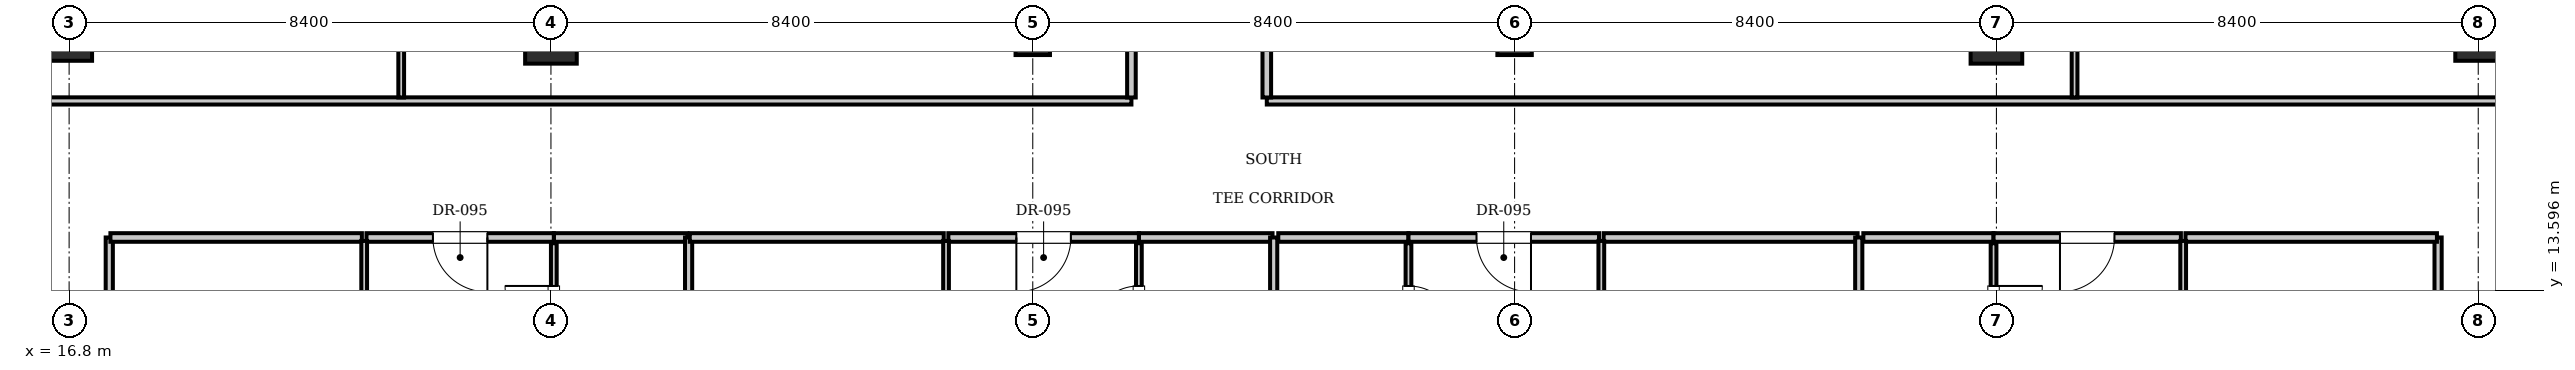
"""IFC4 building model, lengths in metres.
Left out: names, types, materials, properties, quantities, classifications, styles, units other than length and angle.
Written with IfcOpenShell. Run it as: python <this file> out.ifc"""

import sys

from ifc_helpers import new_model, si_unit, direction, frame, frame_2d, origin, origin_2d, place, context, subcontext, project, spatial, rectangle, i_section, extrude, element, fill, save


model = new_model("IFC4")
c1 = context("Model", 3, precision=1e-05, world=origin(), true_north=direction((0.0, 1.0)))
c2 = subcontext(c1, "Body", "Model", "MODEL_VIEW")
j1 = project(units=[si_unit("LENGTHUNIT", "METRE"), si_unit("PLANEANGLEUNIT", "RADIAN")], contexts=[c1])
p1 = place(None, origin())
s1 = spatial("IfcSite", under=j1, at=p1, CompositionType="ELEMENT")
p2 = place(p1, origin())
s2 = spatial("IfcBuilding", under=s1, at=p2, CompositionType="ELEMENT")
p3 = place(p2, frame((0.0, 0.0, 138.95)))
s3 = spatial("IfcBuildingStorey", under=s2, at=p3, CompositionType="ELEMENT", Elevation=138.95)
for number, where, z_axis, x_axis in (
    (1, (25.2, 18.0, 0.0), (0.0, 0.0, 1.0), (1.0, 0.0, 0.0)),
    (2, (50.4, 18.0, 0.0), (0.0, 0.0, 1.0), (1.0, 0.0, 0.0)),
):
    element("IfcColumn", number, at=place(p3, frame(where, z_axis=z_axis, x_axis=x_axis)), inside=s3, PredefinedType="COLUMN", context=c2, shape_type="SweptSolid", body=[
        extrude(rectangle(XDim=0.9, YDim=0.9, at=origin_2d()), origin(), (0.0, 0.0, 1.0), 3.85),
    ])
for number, where, z_axis, x_axis in (
    (3, (33.6, 18.0, 0.0), (0.0, 0.0, 1.0), (1.0, 0.0, 0.0)),
    (4, (42.0, 18.0, 0.0), (0.0, 0.0, 1.0), (1.0, 0.0, 0.0)),
):
    element("IfcColumn", number, at=place(p3, frame(where, z_axis=z_axis, x_axis=x_axis)), inside=s3, PredefinedType="COLUMN", context=c2, shape_type="SweptSolid", body=[
        extrude(i_section(OverallWidth=0.6, OverallDepth=0.6, WebThickness=0.025, FlangeThickness=0.038, at=origin_2d()), origin(), (0.0, 0.0, 1.0), 3.85),
    ])
for number, where, z_axis, x_axis in (
    (5, (16.8, 18.0, 0.0), (0.0, 0.0, 1.0), (1.0, 0.0, 0.0)),
    (6, (58.8, 18.0, 0.0), (0.0, 0.0, 1.0), (1.0, 0.0, 0.0)),
):
    element("IfcColumn", number, at=place(p3, frame(where, z_axis=z_axis, x_axis=x_axis)), inside=s3, PredefinedType="COLUMN", context=c2, shape_type="SweptSolid", body=[
        extrude(rectangle(XDim=0.8, YDim=0.8, at=origin_2d()), origin(), (0.0, 0.0, 1.0), 3.85),
    ])
for number, where, z_axis, x_axis in (
    (7, (17.5, 9.0, 0.0), (0.0, 0.0, 1.0), (0.0, 1.0, 0.0)),
    (8, (58.1, 9.0, 0.0), (0.0, 0.0, 1.0), (0.0, 1.0, 0.0)),
):
    element("IfcWall", number, at=place(p3, frame(where, z_axis=z_axis, x_axis=x_axis)), inside=s3, PredefinedType="PARTITIONING", context=c2, shape_type="SweptSolid", body=[
        extrude(rectangle(XDim=5.52, YDim=0.125, at=frame_2d((2.76, 0.0))), origin(), (0.0, 0.0, 1.0), 3.61),
    ])
p4 = place(p3, frame((25.25, 14.52, 0.0), z_axis=(0.0, 0.0, 1.0), x_axis=(1.0, 0.0, 0.0)))
e9 = element("IfcWall", 9, at=p4, inside=s3, PredefinedType="PARTITIONING", context=c2, shape_type="SweptSolid", body=[
    extrude(rectangle(XDim=2.33, YDim=0.15, at=frame_2d((1.165, 0.0))), origin(), (0.0, 0.0, 1.0), 3.61),
])
p5 = place(p3, frame((25.25, 12.08, 0.0), z_axis=(0.0, 0.0, 1.0), x_axis=(0.0, 1.0, 0.0)))
e10 = element("IfcWall", 10, at=p5, inside=s3, PredefinedType="PARTITIONING", context=c2, shape_type="SweptSolid", body=[
    extrude(rectangle(XDim=2.34, YDim=0.1, at=frame_2d((1.17, 0.0))), origin(), (0.0, 0.0, 1.0), 2.998),
])
p6 = place(p5, frame((0.745, 0.0, 0.0)))
e11 = element("IfcOpeningElement", 11, at=p6, cuts=e10, PredefinedType="OPENING", context=c2, shape_type="SweptSolid", body=[
    extrude(rectangle(XDim=0.85, YDim=2.1, at=frame_2d((0.425, 1.05))), frame((0.0, 0.06, 0.0), z_axis=(0.0, -1.0, 0.0), x_axis=(1.0, 0.0, 0.0)), (0.0, 0.0, 1.0), 0.12),
])
p7 = place(p3, frame((17.52, 14.52, 0.0), z_axis=(0.0, 0.0, 1.0), x_axis=(1.0, 0.0, 0.0)))
e12 = element("IfcWall", 12, at=p7, inside=s3, PredefinedType="PARTITIONING", context=c2, shape_type="SweptSolid", body=[
    extrude(rectangle(XDim=4.384, YDim=0.15, at=frame_2d((2.192, 0.0))), origin(), (0.0, 0.0, 1.0), 3.61),
])
p8 = place(p3, frame((21.984, 14.52, 0.0), z_axis=(0.0, 0.0, 1.0), x_axis=(1.0, 0.0, 0.0)))
e13 = element("IfcWall", 13, at=p8, inside=s3, PredefinedType="PARTITIONING", context=c2, shape_type="SweptSolid", body=[
    extrude(rectangle(XDim=3.266, YDim=0.15, at=frame_2d((1.633, 0.0))), origin(), (0.0, 0.0, 1.0), 3.61),
])
p9 = place(p8, frame((1.158, 0.0, 0.0)))
e14 = element("IfcOpeningElement", 14, at=p9, cuts=e13, PredefinedType="OPENING", context=c2, shape_type="SweptSolid", body=[
    extrude(rectangle(XDim=0.95, YDim=2.15, at=frame_2d((0.475, 1.075))), frame((0.0, 0.085, 0.0), z_axis=(0.0, -1.0, 0.0), x_axis=(1.0, 0.0, 0.0)), (0.0, 0.0, 1.0), 0.17),
])
p10 = place(p3, frame((21.944, 4.63, 0.0), z_axis=(0.0, 0.0, 1.0), x_axis=(0.0, 1.0, 0.0)))
e15 = element("IfcWall", 15, at=p10, inside=s3, PredefinedType="PARTITIONING", context=c2, shape_type="SweptSolid", body=[
    extrude(rectangle(XDim=9.83, YDim=0.1, at=frame_2d((4.915, 0.0))), origin(), (0.0, 0.0, 1.0), 3.61),
])
p11 = place(p10, frame((1.6, 0.0, 0.0)))
e16 = element("IfcOpeningElement", 16, at=p11, cuts=e15, PredefinedType="OPENING", context=c2, shape_type="SweptSolid", body=[
    extrude(rectangle(XDim=0.9, YDim=2.1, at=frame_2d((0.45, 1.05))), frame((0.0, 0.06, 0.0), z_axis=(0.0, -1.0, 0.0), x_axis=(1.0, 0.0, 0.0)), (0.0, 0.0, 1.0), 0.12),
])
p12 = place(p3, frame((27.6, 4.7, 0.0), z_axis=(0.0, 0.0, 1.0), x_axis=(0.0, 1.0, 0.0)))
e17 = element("IfcWall", 17, at=p12, inside=s3, PredefinedType="PARTITIONING", context=c2, shape_type="SweptSolid", body=[
    extrude(rectangle(XDim=9.82, YDim=0.125, at=frame_2d((4.91, 0.0))), origin(), (0.0, 0.0, 1.0), 3.61),
])
p13 = place(p3, frame((35.45, 14.52, 0.0), z_axis=(0.0, 0.0, 1.0), x_axis=(1.0, 0.0, 0.0)))
e18 = element("IfcWall", 18, at=p13, inside=s3, PredefinedType="PARTITIONING", context=c2, shape_type="SweptSolid", body=[
    extrude(rectangle(XDim=2.33, YDim=0.15, at=frame_2d((1.165, 0.0))), origin(), (0.0, 0.0, 1.0), 3.61),
])
p14 = place(p3, frame((35.45, 12.08, 0.0), z_axis=(0.0, 0.0, 1.0), x_axis=(0.0, 1.0, 0.0)))
e19 = element("IfcWall", 19, at=p14, inside=s3, PredefinedType="PARTITIONING", context=c2, shape_type="SweptSolid", body=[
    extrude(rectangle(XDim=2.34, YDim=0.1, at=frame_2d((1.17, 0.0))), origin(), (0.0, 0.0, 1.0), 3.61),
])
p15 = place(p14, frame((0.745, 0.0, 0.0)))
e20 = element("IfcOpeningElement", 20, at=p15, cuts=e19, PredefinedType="OPENING", context=c2, shape_type="SweptSolid", body=[
    extrude(rectangle(XDim=0.85, YDim=2.1, at=frame_2d((0.425, 1.05))), frame((0.0, 0.06, 0.0), z_axis=(0.0, -1.0, 0.0), x_axis=(1.0, 0.0, 0.0)), (0.0, 0.0, 1.0), 0.12),
])
p16 = place(p3, frame((27.62, 14.52, 0.0), z_axis=(0.0, 0.0, 1.0), x_axis=(1.0, 0.0, 0.0)))
e21 = element("IfcWall", 21, at=p16, inside=s3, PredefinedType="PARTITIONING", context=c2, shape_type="SweptSolid", body=[
    extrude(rectangle(XDim=4.428, YDim=0.15, at=frame_2d((2.214, 0.0))), origin(), (0.0, 0.0, 1.0), 3.61),
])
p17 = place(p3, frame((32.128, 14.52, 0.0), z_axis=(0.0, 0.0, 1.0), x_axis=(1.0, 0.0, 0.0)))
e22 = element("IfcWall", 22, at=p17, inside=s3, PredefinedType="PARTITIONING", context=c2, shape_type="SweptSolid", body=[
    extrude(rectangle(XDim=3.322, YDim=0.15, at=frame_2d((1.661, 0.0))), origin(), (0.0, 0.0, 1.0), 3.61),
])
p18 = place(p17, frame((1.186, 0.0, 0.0)))
e23 = element("IfcOpeningElement", 23, at=p18, cuts=e22, PredefinedType="OPENING", context=c2, shape_type="SweptSolid", body=[
    extrude(rectangle(XDim=0.95, YDim=2.15, at=frame_2d((0.475, 1.075))), frame((0.0, 0.085, 0.0), z_axis=(0.0, -1.0, 0.0), x_axis=(1.0, 0.0, 0.0)), (0.0, 0.0, 1.0), 0.17),
])
p19 = place(p3, frame((32.088, 4.63, 0.0), z_axis=(0.0, 0.0, 1.0), x_axis=(0.0, 1.0, 0.0)))
e24 = element("IfcWall", 24, at=p19, inside=s3, PredefinedType="PARTITIONING", context=c2, shape_type="SweptSolid", body=[
    extrude(rectangle(XDim=9.83, YDim=0.1, at=frame_2d((4.915, 0.0))), origin(), (0.0, 0.0, 1.0), 3.61),
])
p20 = place(p19, frame((1.6, 0.0, 0.0)))
e25 = element("IfcOpeningElement", 25, at=p20, cuts=e24, PredefinedType="OPENING", context=c2, shape_type="SweptSolid", body=[
    extrude(rectangle(XDim=0.9, YDim=2.1, at=frame_2d((0.45, 1.05))), frame((0.0, 0.06, 0.0), z_axis=(0.0, -1.0, 0.0), x_axis=(1.0, 0.0, 0.0)), (0.0, 0.0, 1.0), 0.12),
])
p21 = place(p3, frame((37.8, 4.7, 0.0), z_axis=(0.0, 0.0, 1.0), x_axis=(0.0, 1.0, 0.0)))
e26 = element("IfcWall", 26, at=p21, inside=s3, PredefinedType="PARTITIONING", context=c2, shape_type="SweptSolid", body=[
    extrude(rectangle(XDim=9.82, YDim=0.125, at=frame_2d((4.91, 0.0))), origin(), (0.0, 0.0, 1.0), 3.255),
])
p22 = place(p3, frame((37.88, 14.52, 0.0), z_axis=(0.0, 0.0, 1.0), x_axis=(1.0, 0.0, 0.0)))
e27 = element("IfcWall", 27, at=p22, inside=s3, PredefinedType="PARTITIONING", context=c2, shape_type="SweptSolid", body=[
    extrude(rectangle(XDim=2.27, YDim=0.15, at=frame_2d((1.135, 0.0))), origin(), (0.0, 0.0, 1.0), 3.61),
])
p23 = place(p3, frame((40.15, 12.08, 0.0), z_axis=(0.0, 0.0, 1.0), x_axis=(0.0, 1.0, 0.0)))
e28 = element("IfcWall", 28, at=p23, inside=s3, PredefinedType="PARTITIONING", context=c2, shape_type="SweptSolid", body=[
    extrude(rectangle(XDim=2.34, YDim=0.1, at=frame_2d((1.17, 0.0))), origin(), (0.0, 0.0, 1.0), 3.61),
])
p24 = place(p23, frame((0.745, 0.0, 0.0)))
e29 = element("IfcOpeningElement", 29, at=p24, cuts=e28, PredefinedType="OPENING", context=c2, shape_type="SweptSolid", body=[
    extrude(rectangle(XDim=0.85, YDim=2.1, at=frame_2d((0.425, 1.05))), frame((0.0, 0.06, 0.0), z_axis=(0.0, -1.0, 0.0), x_axis=(1.0, 0.0, 0.0)), (0.0, 0.0, 1.0), 0.12),
])
p25 = place(p3, frame((40.15, 14.52, 0.0), z_axis=(0.0, 0.0, 1.0), x_axis=(1.0, 0.0, 0.0)))
e30 = element("IfcWall", 30, at=p25, inside=s3, PredefinedType="PARTITIONING", context=c2, shape_type="SweptSolid", body=[
    extrude(rectangle(XDim=3.322, YDim=0.15, at=frame_2d((1.661, 0.0))), origin(), (0.0, 0.0, 1.0), 3.61),
])
p26 = place(p25, frame((1.186, 0.0, 0.0)))
e31 = element("IfcOpeningElement", 31, at=p26, cuts=e30, PredefinedType="OPENING", context=c2, shape_type="SweptSolid", body=[
    extrude(rectangle(XDim=0.95, YDim=2.15, at=frame_2d((0.475, 1.075))), frame((0.0, 0.085, 0.0), z_axis=(0.0, -1.0, 0.0), x_axis=(1.0, 0.0, 0.0)), (0.0, 0.0, 1.0), 0.17),
])
p27 = place(p3, frame((43.552, 14.52, 0.0), z_axis=(0.0, 0.0, 1.0), x_axis=(1.0, 0.0, 0.0)))
e32 = element("IfcWall", 32, at=p27, inside=s3, PredefinedType="PARTITIONING", context=c2, shape_type="SweptSolid", body=[
    extrude(rectangle(XDim=4.428, YDim=0.15, at=frame_2d((2.214, 0.0))), origin(), (0.0, 0.0, 1.0), 3.61),
])
p28 = place(p3, frame((43.512, 4.63, 0.0), z_axis=(0.0, 0.0, 1.0), x_axis=(0.0, 1.0, 0.0)))
e33 = element("IfcWall", 33, at=p28, inside=s3, PredefinedType="PARTITIONING", context=c2, shape_type="SweptSolid", body=[
    extrude(rectangle(XDim=9.83, YDim=0.1, at=frame_2d((4.915, 0.0))), origin(), (0.0, 0.0, 1.0), 3.61),
])
p29 = place(p28, frame((1.6, 0.0, 0.0)))
e34 = element("IfcOpeningElement", 34, at=p29, cuts=e33, PredefinedType="OPENING", context=c2, shape_type="SweptSolid", body=[
    extrude(rectangle(XDim=0.9, YDim=2.1, at=frame_2d((0.45, 1.05))), frame((0.0, 0.06, 0.0), z_axis=(0.0, -1.0, 0.0), x_axis=(1.0, 0.0, 0.0)), (0.0, 0.0, 1.0), 0.12),
])
p30 = place(p3, frame((48.0, 4.7, 0.0), z_axis=(0.0, 0.0, 1.0), x_axis=(0.0, 1.0, 0.0)))
e35 = element("IfcWall", 35, at=p30, inside=s3, PredefinedType="PARTITIONING", context=c2, shape_type="SweptSolid", body=[
    extrude(rectangle(XDim=9.82, YDim=0.125, at=frame_2d((4.91, 0.0))), origin(), (0.0, 0.0, 1.0), 3.61),
])
p31 = place(p3, frame((48.08, 14.52, 0.0), z_axis=(0.0, 0.0, 1.0), x_axis=(1.0, 0.0, 0.0)))
e36 = element("IfcWall", 36, at=p31, inside=s3, PredefinedType="PARTITIONING", context=c2, shape_type="SweptSolid", body=[
    extrude(rectangle(XDim=2.27, YDim=0.15, at=frame_2d((1.135, 0.0))), origin(), (0.0, 0.0, 1.0), 3.61),
])
p32 = place(p3, frame((50.35, 12.08, 0.0), z_axis=(0.0, 0.0, 1.0), x_axis=(0.0, 1.0, 0.0)))
e37 = element("IfcWall", 37, at=p32, inside=s3, PredefinedType="PARTITIONING", context=c2, shape_type="SweptSolid", body=[
    extrude(rectangle(XDim=2.34, YDim=0.1, at=frame_2d((1.17, 0.0))), origin(), (0.0, 0.0, 1.0), 2.998),
])
p33 = place(p32, frame((0.745, 0.0, 0.0)))
e38 = element("IfcOpeningElement", 38, at=p33, cuts=e37, PredefinedType="OPENING", context=c2, shape_type="SweptSolid", body=[
    extrude(rectangle(XDim=0.85, YDim=2.1, at=frame_2d((0.425, 1.05))), frame((0.0, 0.06, 0.0), z_axis=(0.0, -1.0, 0.0), x_axis=(1.0, 0.0, 0.0)), (0.0, 0.0, 1.0), 0.12),
])
p34 = place(p3, frame((50.35, 14.52, 0.0), z_axis=(0.0, 0.0, 1.0), x_axis=(1.0, 0.0, 0.0)))
e39 = element("IfcWall", 39, at=p34, inside=s3, PredefinedType="PARTITIONING", context=c2, shape_type="SweptSolid", body=[
    extrude(rectangle(XDim=3.266, YDim=0.15, at=frame_2d((1.633, 0.0))), origin(), (0.0, 0.0, 1.0), 3.61),
])
p35 = place(p34, frame((1.158, 0.0, 0.0)))
e40 = element("IfcOpeningElement", 40, at=p35, cuts=e39, PredefinedType="OPENING", context=c2, shape_type="SweptSolid", body=[
    extrude(rectangle(XDim=0.95, YDim=2.15, at=frame_2d((0.475, 1.075))), frame((0.0, 0.085, 0.0), z_axis=(0.0, -1.0, 0.0), x_axis=(1.0, 0.0, 0.0)), (0.0, 0.0, 1.0), 0.17),
])
p36 = place(p3, frame((53.696, 14.52, 0.0), z_axis=(0.0, 0.0, 1.0), x_axis=(1.0, 0.0, 0.0)))
e41 = element("IfcWall", 41, at=p36, inside=s3, PredefinedType="PARTITIONING", context=c2, shape_type="SweptSolid", body=[
    extrude(rectangle(XDim=4.384, YDim=0.15, at=frame_2d((2.192, 0.0))), origin(), (0.0, 0.0, 1.0), 3.61),
])
p37 = place(p3, frame((53.656, 4.63, 0.0), z_axis=(0.0, 0.0, 1.0), x_axis=(0.0, 1.0, 0.0)))
e42 = element("IfcWall", 42, at=p37, inside=s3, PredefinedType="PARTITIONING", context=c2, shape_type="SweptSolid", body=[
    extrude(rectangle(XDim=9.83, YDim=0.1, at=frame_2d((4.915, 0.0))), origin(), (0.0, 0.0, 1.0), 3.61),
])
p38 = place(p37, frame((1.6, 0.0, 0.0)))
e43 = element("IfcOpeningElement", 43, at=p38, cuts=e42, PredefinedType="OPENING", context=c2, shape_type="SweptSolid", body=[
    extrude(rectangle(XDim=0.9, YDim=2.1, at=frame_2d((0.45, 1.05))), frame((0.0, 0.06, 0.0), z_axis=(0.0, -1.0, 0.0), x_axis=(1.0, 0.0, 0.0)), (0.0, 0.0, 1.0), 0.12),
])
p39 = place(p3, frame((13.2, 16.9, 0.0), z_axis=(0.0, 0.0, 1.0), x_axis=(1.0, 0.0, 0.0)))
e44 = element("IfcWall", 44, at=p39, inside=s3, PredefinedType="PARTITIONING", context=c2, shape_type="SweptSolid", body=[
    extrude(rectangle(XDim=22.12, YDim=0.125, at=frame_2d((11.06, 0.0))), origin(), (0.0, 0.0, 1.0), 3.61),
])
p40 = place(p3, frame((37.68, 16.9, 0.0), z_axis=(0.0, 0.0, 1.0), x_axis=(1.0, 0.0, 0.0)))
e45 = element("IfcWall", 45, at=p40, inside=s3, PredefinedType="PARTITIONING", context=c2, shape_type="SweptSolid", body=[
    extrude(rectangle(XDim=24.72, YDim=0.125, at=frame_2d((12.36, 0.0))), origin(), (0.0, 0.0, 1.0), 3.61),
])
p41 = place(p3, frame((35.32, 16.96, 0.0), z_axis=(0.0, 0.0, 1.0), x_axis=(0.0, 1.0, 0.0)))
e46 = element("IfcWall", 46, at=p41, inside=s3, PredefinedType="PARTITIONING", context=c2, shape_type="SweptSolid", body=[
    extrude(rectangle(XDim=2.72, YDim=0.15, at=frame_2d((1.36, 0.0))), origin(), (0.0, 0.0, 1.0), 3.61),
])
p42 = place(p41, frame((0.885, 0.0, 0.0)))
e47 = element("IfcOpeningElement", 47, at=p42, cuts=e46, PredefinedType="OPENING", context=c2, shape_type="SweptSolid", body=[
    extrude(rectangle(XDim=0.95, YDim=2.15, at=frame_2d((0.475, 1.075))), frame((0.0, 0.085, 0.0), z_axis=(0.0, -1.0, 0.0), x_axis=(1.0, 0.0, 0.0)), (0.0, 0.0, 1.0), 0.17),
])
p43 = place(p3, frame((22.59, 16.96, 0.0), z_axis=(0.0, 0.0, 1.0), x_axis=(0.0, 1.0, 0.0)))
e48 = element("IfcWall", 48, at=p43, inside=s3, PredefinedType="PARTITIONING", context=c2, shape_type="SweptSolid", body=[
    extrude(rectangle(XDim=4.61, YDim=0.1, at=frame_2d((2.305, 0.0))), origin(), (0.0, 0.0, 1.0), 3.61),
])
p44 = place(p43, frame((1.855, 0.0, 0.0)))
e49 = element("IfcOpeningElement", 49, at=p44, cuts=e48, PredefinedType="OPENING", context=c2, shape_type="SweptSolid", body=[
    extrude(rectangle(XDim=0.9, YDim=2.1, at=frame_2d((0.45, 1.05))), frame((0.0, 0.06, 0.0), z_axis=(0.0, -1.0, 0.0), x_axis=(1.0, 0.0, 0.0)), (0.0, 0.0, 1.0), 0.12),
])
p45 = place(p3, frame((37.68, 16.96, 0.0), z_axis=(0.0, 0.0, 1.0), x_axis=(0.0, 1.0, 0.0)))
e50 = element("IfcWall", 50, at=p45, inside=s3, PredefinedType="PARTITIONING", context=c2, shape_type="SweptSolid", body=[
    extrude(rectangle(XDim=2.72, YDim=0.15, at=frame_2d((1.36, 0.0))), origin(), (0.0, 0.0, 1.0), 3.255),
])
p46 = place(p45, frame((0.885, 0.0, 0.0)))
e51 = element("IfcOpeningElement", 51, at=p46, cuts=e50, PredefinedType="OPENING", context=c2, shape_type="SweptSolid", body=[
    extrude(rectangle(XDim=0.95, YDim=2.15, at=frame_2d((0.475, 1.075))), frame((0.0, 0.085, 0.0), z_axis=(0.0, -1.0, 0.0), x_axis=(1.0, 0.0, 0.0)), (0.0, 0.0, 1.0), 0.17),
])
p47 = place(p3, frame((51.762, 16.96, 0.0), z_axis=(0.0, 0.0, 1.0), x_axis=(0.0, 1.0, 0.0)))
e52 = element("IfcWall", 52, at=p47, inside=s3, PredefinedType="PARTITIONING", context=c2, shape_type="SweptSolid", body=[
    extrude(rectangle(XDim=4.61, YDim=0.1, at=frame_2d((2.305, 0.0))), origin(), (0.0, 0.0, 1.0), 3.61),
])
p48 = place(p47, frame((1.855, 0.0, 0.0)))
e53 = element("IfcOpeningElement", 53, at=p48, cuts=e52, PredefinedType="OPENING", context=c2, shape_type="SweptSolid", body=[
    extrude(rectangle(XDim=0.9, YDim=2.1, at=frame_2d((0.45, 1.05))), frame((0.0, 0.06, 0.0), z_axis=(0.0, -1.0, 0.0), x_axis=(1.0, 0.0, 0.0)), (0.0, 0.0, 1.0), 0.12),
])
p49 = place(p6, origin())
e54 = element("IfcDoor", 54, at=p49, inside=s3, OperationType="SINGLE_SWING_RIGHT", PredefinedType="DOOR", context=c2, shape_type="SweptSolid", body=[
    extrude(rectangle(XDim=0.85, YDim=2.1, at=frame_2d((0.425, 1.05))), frame((0.0, 0.025, 0.0), z_axis=(0.0, -1.0, 0.0), x_axis=(1.0, 0.0, 0.0)), (0.0, 0.0, 1.0), 0.05),
])
fill(e11, e54)
p50 = place(p9, frame((0.95, 0.0, 0.0), z_axis=(0.0, 0.0, 1.0), x_axis=(-1.0, 0.0, 0.0)))
e55 = element("IfcDoor", 55, at=p50, inside=s3, OperationType="SINGLE_SWING_LEFT", PredefinedType="DOOR", context=c2, shape_type="SweptSolid", body=[
    extrude(rectangle(XDim=0.95, YDim=2.15, at=frame_2d((0.475, 1.075))), frame((0.0, 0.025, 0.0), z_axis=(0.0, -1.0, 0.0), x_axis=(1.0, 0.0, 0.0)), (0.0, 0.0, 1.0), 0.05),
])
fill(e14, e55)
p51 = place(p15, origin())
e56 = element("IfcDoor", 56, at=p51, inside=s3, OperationType="SINGLE_SWING_LEFT", PredefinedType="DOOR", context=c2, shape_type="SweptSolid", body=[
    extrude(rectangle(XDim=0.85, YDim=2.1, at=frame_2d((0.425, 1.05))), frame((0.0, 0.025, 0.0), z_axis=(0.0, -1.0, 0.0), x_axis=(1.0, 0.0, 0.0)), (0.0, 0.0, 1.0), 0.05),
])
fill(e20, e56)
p52 = place(p18, frame((0.95, 0.0, 0.0), z_axis=(0.0, 0.0, 1.0), x_axis=(-1.0, 0.0, 0.0)))
e57 = element("IfcDoor", 57, at=p52, inside=s3, OperationType="SINGLE_SWING_RIGHT", PredefinedType="DOOR", context=c2, shape_type="SweptSolid", body=[
    extrude(rectangle(XDim=0.95, YDim=2.15, at=frame_2d((0.475, 1.075))), frame((0.0, 0.025, 0.0), z_axis=(0.0, -1.0, 0.0), x_axis=(1.0, 0.0, 0.0)), (0.0, 0.0, 1.0), 0.05),
])
fill(e23, e57)
p53 = place(p24, frame((0.85, 0.0, 0.0), z_axis=(0.0, 0.0, 1.0), x_axis=(-1.0, 0.0, 0.0)))
e58 = element("IfcDoor", 58, at=p53, inside=s3, OperationType="SINGLE_SWING_RIGHT", PredefinedType="DOOR", context=c2, shape_type="SweptSolid", body=[
    extrude(rectangle(XDim=0.85, YDim=2.1, at=frame_2d((0.425, 1.05))), frame((0.0, 0.025, 0.0), z_axis=(0.0, -1.0, 0.0), x_axis=(1.0, 0.0, 0.0)), (0.0, 0.0, 1.0), 0.05),
])
fill(e29, e58)
p54 = place(p26, frame((0.95, 0.0, 0.0), z_axis=(0.0, 0.0, 1.0), x_axis=(-1.0, 0.0, 0.0)))
e59 = element("IfcDoor", 59, at=p54, inside=s3, OperationType="SINGLE_SWING_LEFT", PredefinedType="DOOR", context=c2, shape_type="SweptSolid", body=[
    extrude(rectangle(XDim=0.95, YDim=2.15, at=frame_2d((0.475, 1.075))), frame((0.0, 0.025, 0.0), z_axis=(0.0, -1.0, 0.0), x_axis=(1.0, 0.0, 0.0)), (0.0, 0.0, 1.0), 0.05),
])
fill(e31, e59)
p55 = place(p33, frame((0.85, 0.0, 0.0), z_axis=(0.0, 0.0, 1.0), x_axis=(-1.0, 0.0, 0.0)))
e60 = element("IfcDoor", 60, at=p55, inside=s3, OperationType="SINGLE_SWING_LEFT", PredefinedType="DOOR", context=c2, shape_type="SweptSolid", body=[
    extrude(rectangle(XDim=0.85, YDim=2.1, at=frame_2d((0.425, 1.05))), frame((0.0, 0.025, 0.0), z_axis=(0.0, -1.0, 0.0), x_axis=(1.0, 0.0, 0.0)), (0.0, 0.0, 1.0), 0.05),
])
fill(e38, e60)
p56 = place(p35, frame((0.95, 0.0, 0.0), z_axis=(0.0, 0.0, 1.0), x_axis=(-1.0, 0.0, 0.0)))
e61 = element("IfcDoor", 61, at=p56, inside=s3, OperationType="SINGLE_SWING_RIGHT", PredefinedType="DOOR", context=c2, shape_type="SweptSolid", body=[
    extrude(rectangle(XDim=0.95, YDim=2.15, at=frame_2d((0.475, 1.075))), frame((0.0, 0.025, 0.0), z_axis=(0.0, -1.0, 0.0), x_axis=(1.0, 0.0, 0.0)), (0.0, 0.0, 1.0), 0.05),
])
fill(e40, e61)
save(model, sys.argv[1])
